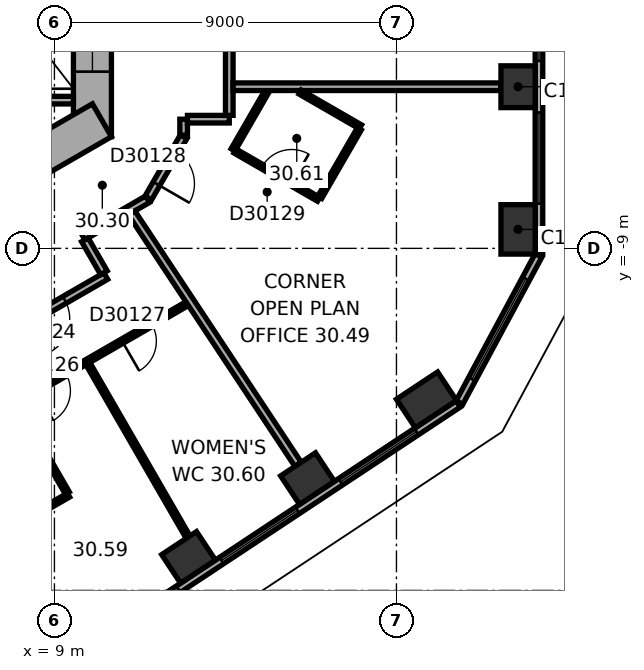
"""IFC4 building model, lengths in metres.
Left out: names, types, materials, properties, quantities, classifications, styles, units other than length and angle.
Written with IfcOpenShell. Run it as: python <this file> out.ifc"""

import sys

from ifc_helpers import new_model, si_unit, direction, frame, frame_2d, origin, origin_2d, place, context, subcontext, project, spatial, rectangle, extrude, element, fill, save


model = new_model("IFC4")
c1 = context("Model", 3, precision=1e-05, world=origin(), true_north=direction((0.0, 1.0)))
c2 = subcontext(c1, "Body", "Model", "MODEL_VIEW")
j1 = project(units=[si_unit("LENGTHUNIT", "METRE"), si_unit("PLANEANGLEUNIT", "RADIAN")], contexts=[c1])
p1 = place(None, origin())
s1 = spatial("IfcSite", under=j1, at=p1, CompositionType="ELEMENT")
p2 = place(p1, origin())
s2 = spatial("IfcBuilding", under=s1, at=p2, CompositionType="ELEMENT")
p3 = place(p2, frame((0.0, 0.0, 124.4)))
s3 = spatial("IfcBuildingStorey", under=s2, at=p3, CompositionType="ELEMENT", Elevation=124.4)
p4 = place(p3, frame((21.2, -8.501, 0.0), z_axis=(0.0, 0.0, 1.0), x_axis=(0.0, 1.0, 0.0)))
e1 = element("IfcColumn", 1, at=p4, inside=s3, PredefinedType="COLUMN", context=c2, shape_type="SweptSolid", body=[
    extrude(rectangle(XDim=1.3, YDim=0.9, at=origin_2d()), origin(), (0.0, 0.0, 1.0), 3.7),
])
for number, where, z_axis, x_axis in (
    (2, (21.2, -4.747, 0.0), (0.0, 0.0, 1.0), (0.0, 1.0, 0.0)),
    (3, (12.529, -17.13, 0.0), (0.0, 0.0, 1.0), (0.834, 0.552, 0.0)),
    (4, (15.659, -15.058, 0.0), (0.0, 0.0, 1.0), (0.834, 0.552, 0.0)),
):
    element("IfcColumn", number, at=place(p3, frame(where, z_axis=z_axis, x_axis=x_axis)), inside=s3, PredefinedType="COLUMN", context=c2, shape_type="SweptSolid", body=[
        extrude(rectangle(XDim=1.1, YDim=0.9, at=origin_2d()), origin(), (0.0, 0.0, 1.0), 3.7),
    ])
p5 = place(p3, frame((18.79, -12.986, 0.0), z_axis=(0.0, 0.0, 1.0), x_axis=(0.833885822067, 0.551936985312, 0.0)))
e5 = element("IfcColumn", 5, at=p5, inside=s3, PredefinedType="COLUMN", context=c2, shape_type="SweptSolid", body=[
    extrude(rectangle(XDim=1.3, YDim=0.9, at=origin_2d()), origin(), (0.0, 0.0, 1.0), 3.7),
])
p6 = place(p3, frame((10.0, -6.062, 0.0), z_axis=(0.0, 0.0, 1.0), x_axis=(0.0, 1.0, 0.0)))
e6 = element("IfcWall", 6, at=p6, inside=s3, PredefinedType="SHEAR", context=c2, shape_type="SweptSolid", body=[
    extrude(rectangle(XDim=12.125, YDim=1.0, at=frame_2d((6.062, 0.0))), origin(), (0.0, 0.0, 1.0), 3.7),
])
p7 = place(p6, frame((6.262, 0.0, 0.0)))
e7 = element("IfcOpeningElement", 7, at=p7, cuts=e6, PredefinedType="OPENING", context=c2, shape_type="SweptSolid", body=[
    extrude(rectangle(XDim=1.5, YDim=2.1, at=frame_2d((0.75, 1.05))), frame((0.0, 0.51, 0.0), z_axis=(0.0, -1.0, 0.0), x_axis=(1.0, 0.0, 0.0)), (0.0, 0.0, 1.0), 1.02),
])
p8 = place(p6, frame((1.712, 0.0, 0.0)))
e8 = element("IfcOpeningElement", 8, at=p8, cuts=e6, PredefinedType="OPENING", context=c2, shape_type="SweptSolid", body=[
    extrude(rectangle(XDim=1.1, YDim=2.1, at=frame_2d((0.55, 1.05))), frame((0.0, 0.51, 0.0), z_axis=(0.0, -1.0, 0.0), x_axis=(1.0, 0.0, 0.0)), (0.0, 0.0, 1.0), 1.02),
])
p9 = place(p6, frame((4.312, 0.0, 0.0)))
e9 = element("IfcOpeningElement", 9, at=p9, cuts=e6, PredefinedType="OPENING", context=c2, shape_type="SweptSolid", body=[
    extrude(rectangle(XDim=1.1, YDim=2.1, at=frame_2d((0.55, 1.05))), frame((0.0, 0.51, 0.0), z_axis=(0.0, -1.0, 0.0), x_axis=(1.0, 0.0, 0.0)), (0.0, 0.0, 1.0), 1.02),
])
p10 = place(p3, frame((-0.25, -11.691, 0.0), z_axis=(0.0, 0.0, 1.0), x_axis=(0.866022616891, 0.50000482701, 0.0)))
e10 = element("IfcWall", 10, at=p10, inside=s3, PredefinedType="SHEAR", context=c2, shape_type="SweptSolid", body=[
    extrude(rectangle(XDim=12.125, YDim=1.0, at=frame_2d((6.062, 0.0))), origin(), (0.0, 0.0, 1.0), 3.7),
])
p11 = place(p10, frame((4.012, 0.0, 0.0)))
e11 = element("IfcOpeningElement", 11, at=p11, cuts=e10, PredefinedType="OPENING", context=c2, shape_type="SweptSolid", body=[
    extrude(rectangle(XDim=0.9, YDim=2.1, at=frame_2d((0.45, 1.05))), frame((0.0, 0.51, 0.0), z_axis=(0.0, -1.0, 0.0), x_axis=(1.0, 0.0, 0.0)), (0.0, 0.0, 1.0), 1.02),
])
p12 = place(p10, frame((7.812, 0.0, 0.0)))
e12 = element("IfcOpeningElement", 12, at=p12, cuts=e10, PredefinedType="OPENING", context=c2, shape_type="SweptSolid", body=[
    extrude(rectangle(XDim=1.1, YDim=2.1, at=frame_2d((0.55, 1.05))), frame((0.0, 0.51, 0.0), z_axis=(0.0, -1.0, 0.0), x_axis=(1.0, 0.0, 0.0)), (0.0, 0.0, 1.0), 1.02),
])
p13 = place(p3, frame((21.75, -9.138, 0.0), z_axis=(0.0, 0.0, 1.0), x_axis=(0.0, 1.0, 0.0)))
e13 = element("IfcWall", 13, at=p13, inside=s3, PredefinedType="STANDARD", context=c2, shape_type="SweptSolid", body=[
    extrude(rectangle(XDim=20.044, YDim=0.2, at=frame_2d((10.022, 0.0))), origin(), (0.0, 0.0, 1.0), 3.7),
])
p14 = place(p13, frame((1.314, 0.0, 0.9)))
e14 = element("IfcOpeningElement", 14, at=p14, cuts=e13, PredefinedType="OPENING", context=c2, shape_type="SweptSolid", body=[
    extrude(rectangle(XDim=2.4, YDim=2.0, at=frame_2d((1.2, 1.0))), frame((0.0, 0.11, 0.0), z_axis=(0.0, -1.0, 0.0), x_axis=(1.0, 0.0, 0.0)), (0.0, 0.0, 1.0), 0.22),
])
p15 = place(p13, frame((5.069, 0.0, 0.9)))
e15 = element("IfcOpeningElement", 15, at=p15, cuts=e13, PredefinedType="OPENING", context=c2, shape_type="SweptSolid", body=[
    extrude(rectangle(XDim=2.4, YDim=2.0, at=frame_2d((1.2, 1.0))), frame((0.0, 0.11, 0.0), z_axis=(0.0, -1.0, 0.0), x_axis=(1.0, 0.0, 0.0)), (0.0, 0.0, 1.0), 0.22),
])
p16 = place(p13, frame((8.823, 0.0, 0.9)))
e16 = element("IfcOpeningElement", 16, at=p16, cuts=e13, PredefinedType="OPENING", context=c2, shape_type="SweptSolid", body=[
    extrude(rectangle(XDim=2.4, YDim=2.0, at=frame_2d((1.2, 1.0))), frame((0.0, 0.11, 0.0), z_axis=(0.0, -1.0, 0.0), x_axis=(1.0, 0.0, 0.0)), (0.0, 0.0, 1.0), 0.22),
])
p17 = place(p13, frame((12.577, 0.0, 0.9)))
e17 = element("IfcOpeningElement", 17, at=p17, cuts=e13, PredefinedType="OPENING", context=c2, shape_type="SweptSolid", body=[
    extrude(rectangle(XDim=2.4, YDim=2.0, at=frame_2d((1.2, 1.0))), frame((0.0, 0.11, 0.0), z_axis=(0.0, -1.0, 0.0), x_axis=(1.0, 0.0, 0.0)), (0.0, 0.0, 1.0), 0.22),
])
p18 = place(p13, frame((16.331, 0.0, 0.9)))
e18 = element("IfcOpeningElement", 18, at=p18, cuts=e13, PredefinedType="OPENING", context=c2, shape_type="SweptSolid", body=[
    extrude(rectangle(XDim=2.4, YDim=2.0, at=frame_2d((1.2, 1.0))), frame((0.0, 0.11, 0.0), z_axis=(0.0, -1.0, 0.0), x_axis=(1.0, 0.0, 0.0)), (0.0, 0.0, 1.0), 0.22),
])
p19 = place(p3, frame((2.911, -24.156, 0.0), z_axis=(0.0, 0.0, 1.0), x_axis=(0.833882163564, 0.551942512668, 0.0)))
e19 = element("IfcWall", 19, at=p19, inside=s3, PredefinedType="STANDARD", context=c2, shape_type="SweptSolid", body=[
    extrude(rectangle(XDim=20.044, YDim=0.2, at=frame_2d((10.022, 0.0))), origin(), (0.0, 0.0, 1.0), 3.7),
])
p20 = place(p19, frame((1.313, 0.0, 0.9)))
e20 = element("IfcOpeningElement", 20, at=p20, cuts=e19, PredefinedType="OPENING", context=c2, shape_type="SweptSolid", body=[
    extrude(rectangle(XDim=2.4, YDim=2.0, at=frame_2d((1.2, 1.0))), frame((0.0, 0.11, 0.0), z_axis=(0.0, -1.0, 0.0), x_axis=(1.0, 0.0, 0.0)), (0.0, 0.0, 1.0), 0.22),
])
p21 = place(p19, frame((5.067, 0.0, 0.9)))
e21 = element("IfcOpeningElement", 21, at=p21, cuts=e19, PredefinedType="OPENING", context=c2, shape_type="SweptSolid", body=[
    extrude(rectangle(XDim=2.4, YDim=2.0, at=frame_2d((1.2, 1.0))), frame((0.0, 0.11, 0.0), z_axis=(0.0, -1.0, 0.0), x_axis=(1.0, 0.0, 0.0)), (0.0, 0.0, 1.0), 0.22),
])
p22 = place(p19, frame((8.821, 0.0, 0.9)))
e22 = element("IfcOpeningElement", 22, at=p22, cuts=e19, PredefinedType="OPENING", context=c2, shape_type="SweptSolid", body=[
    extrude(rectangle(XDim=2.4, YDim=2.0, at=frame_2d((1.2, 1.0))), frame((0.0, 0.11, 0.0), z_axis=(0.0, -1.0, 0.0), x_axis=(1.0, 0.0, 0.0)), (0.0, 0.0, 1.0), 0.22),
])
p23 = place(p19, frame((12.575, 0.0, 0.9)))
e23 = element("IfcOpeningElement", 23, at=p23, cuts=e19, PredefinedType="OPENING", context=c2, shape_type="SweptSolid", body=[
    extrude(rectangle(XDim=2.4, YDim=2.0, at=frame_2d((1.2, 1.0))), frame((0.0, 0.11, 0.0), z_axis=(0.0, -1.0, 0.0), x_axis=(1.0, 0.0, 0.0)), (0.0, 0.0, 1.0), 0.22),
])
p24 = place(p19, frame((16.329, 0.0, 0.9)))
e24 = element("IfcOpeningElement", 24, at=p24, cuts=e19, PredefinedType="OPENING", context=c2, shape_type="SweptSolid", body=[
    extrude(rectangle(XDim=2.4, YDim=2.0, at=frame_2d((1.2, 1.0))), frame((0.0, 0.11, 0.0), z_axis=(0.0, -1.0, 0.0), x_axis=(1.0, 0.0, 0.0)), (0.0, 0.0, 1.0), 0.22),
])
p25 = place(p3, frame((19.658, -13.057, 0.0), z_axis=(0.0, 0.0, 1.0), x_axis=(0.473307879841, 0.880897071672, 0.0)))
e25 = element("IfcWall", 25, at=p25, inside=s3, PredefinedType="STANDARD", context=c2, shape_type="SweptSolid", body=[
    extrude(rectangle(XDim=4.395, YDim=0.2, at=frame_2d((2.197, 0.0))), origin(), (0.0, 0.0, 1.0), 3.7),
])
p26 = place(p25, frame((0.698, 0.0, 0.9)))
e26 = element("IfcOpeningElement", 26, at=p26, cuts=e25, PredefinedType="OPENING", context=c2, shape_type="SweptSolid", body=[
    extrude(rectangle(XDim=3.0, YDim=2.0, at=frame_2d((1.5, 1.0))), frame((0.0, 0.11, 0.0), z_axis=(0.0, -1.0, 0.0), x_axis=(1.0, 0.0, 0.0)), (0.0, 0.0, 1.0), 0.22),
])
p27 = place(p3, frame((7.3, -5.1, 0.0), z_axis=(0.0, 0.0, 1.0), x_axis=(1.0, 0.0, 0.0)))
e27 = element("IfcWall", 27, at=p27, inside=s3, PredefinedType="PARTITIONING", context=c2, shape_type="SweptSolid", body=[
    extrude(rectangle(XDim=2.2, YDim=0.2, at=frame_2d((1.1, 0.0))), origin(), (0.0, 0.0, 1.0), 3.42),
])
p28 = place(p3, frame((6.152, -14.116, 0.0), z_axis=(0.0, 0.0, 1.0), x_axis=(0.866026788224, 0.499997602072, 0.0)))
e28 = element("IfcWall", 28, at=p28, inside=s3, PredefinedType="PARTITIONING", context=c2, shape_type="SweptSolid", body=[
    extrude(rectangle(XDim=7.322, YDim=0.12, at=frame_2d((3.661, 0.0))), origin(), (0.0, 0.0, 1.0), 3.42),
])
p29 = place(p28, frame((0.55, 0.0, 0.0)))
e29 = element("IfcOpeningElement", 29, at=p29, cuts=e28, PredefinedType="OPENING", context=c2, shape_type="SweptSolid", body=[
    extrude(rectangle(XDim=1.0, YDim=2.1, at=frame_2d((0.5, 1.05))), frame((0.0, 0.07, 0.0), z_axis=(0.0, -1.0, 0.0), x_axis=(1.0, 0.0, 0.0)), (0.0, 0.0, 1.0), 0.14),
])
p30 = place(p28, frame((2.736, 0.0, 0.0)))
e30 = element("IfcOpeningElement", 30, at=p30, cuts=e28, PredefinedType="OPENING", context=c2, shape_type="SweptSolid", body=[
    extrude(rectangle(XDim=0.9, YDim=2.1, at=frame_2d((0.45, 1.05))), frame((0.0, 0.07, 0.0), z_axis=(0.0, -1.0, 0.0), x_axis=(1.0, 0.0, 0.0)), (0.0, 0.0, 1.0), 0.14),
])
p31 = place(p28, frame((5.347, 0.0, 0.0)))
e31 = element("IfcOpeningElement", 31, at=p31, cuts=e28, PredefinedType="OPENING", context=c2, shape_type="SweptSolid", body=[
    extrude(rectangle(XDim=0.9, YDim=2.1, at=frame_2d((0.45, 1.05))), frame((0.0, 0.07, 0.0), z_axis=(0.0, -1.0, 0.0), x_axis=(1.0, 0.0, 0.0)), (0.0, 0.0, 1.0), 0.14),
])
p32 = place(p3, frame((7.319, -11.479, 0.0), z_axis=(0.0, 0.0, 1.0), x_axis=(0.866038154057, 0.49997791523, 0.0)))
e32 = element("IfcWall", 32, at=p32, inside=s3, PredefinedType="PARTITIONING", context=c2, shape_type="SweptSolid", body=[
    extrude(rectangle(XDim=3.502, YDim=0.2, at=frame_2d((1.751, 0.0))), origin(), (0.0, 0.0, 1.0), 3.42),
])
p33 = place(p32, frame((1.251, 0.0, 0.0)))
e33 = element("IfcOpeningElement", 33, at=p33, cuts=e32, PredefinedType="OPENING", context=c2, shape_type="SweptSolid", body=[
    extrude(rectangle(XDim=1.0, YDim=2.1, at=frame_2d((0.5, 1.05))), frame((0.0, 0.11, 0.0), z_axis=(0.0, -1.0, 0.0), x_axis=(1.0, 0.0, 0.0)), (0.0, 0.0, 1.0), 0.22),
])
p34 = place(p3, frame((7.7, -16.456, 0.0), z_axis=(0.0, 0.0, 1.0), x_axis=(0.86603803935, 0.499978113919, 0.0)))
e34 = element("IfcWall", 34, at=p34, inside=s3, PredefinedType="PARTITIONING", context=c2, shape_type="SweptSolid", body=[
    extrude(rectangle(XDim=1.929, YDim=0.12, at=frame_2d((0.964, 0.0))), origin(), (0.0, 0.0, 1.0), 3.42),
])
p35 = place(p3, frame((9.15, -18.827, 0.0), z_axis=(0.0, 0.0, 1.0), x_axis=(-0.551942527453, 0.833882153777, 0.0)))
e35 = element("IfcWall", 35, at=p35, inside=s3, PredefinedType="PARTITIONING", context=c2, shape_type="SweptSolid", body=[
    extrude(rectangle(XDim=8.386, YDim=0.2, at=frame_2d((4.193, 0.0))), origin(), (0.0, 0.0, 1.0), 2.87),
])
p36 = place(p3, frame((9.34, -15.439, 0.0), z_axis=(0.0, 0.0, 1.0), x_axis=(-0.500048396672, 0.86599746015, 0.0)))
e36 = element("IfcWall", 36, at=p36, inside=s3, PredefinedType="PARTITIONING", context=c2, shape_type="SweptSolid", body=[
    extrude(rectangle(XDim=2.68, YDim=0.12, at=frame_2d((1.34, 0.0))), origin(), (0.0, 0.0, 1.0), 3.42),
])
p37 = place(p3, frame((9.752, -8.688, 0.0), z_axis=(0.0, 0.0, 1.0), x_axis=(0.865974105138, 0.500088841337, 0.0)))
e37 = element("IfcWall", 37, at=p37, inside=s3, PredefinedType="PARTITIONING", context=c2, shape_type="SweptSolid", body=[
    extrude(rectangle(XDim=1.961, YDim=0.2, at=frame_2d((0.98, 0.0))), origin(), (0.0, 0.0, 1.0), 3.42),
])
p38 = place(p3, frame((10.302, -9.642, 0.0), z_axis=(0.0, 0.0, 1.0), x_axis=(-0.500074377092, 0.865982457891, 0.0)))
e38 = element("IfcWall", 38, at=p38, inside=s3, PredefinedType="PARTITIONING", context=c2, shape_type="SweptSolid", body=[
    extrude(rectangle(XDim=1.001, YDim=0.2, at=frame_2d((0.5, 0.0))), origin(), (0.0, 0.0, 1.0), 3.42),
])
p39 = place(p3, frame((11.47, -7.673, 0.0), z_axis=(0.0, 0.0, 1.0), x_axis=(0.499964847546, 0.866045698112, 0.0)))
e39 = element("IfcWall", 39, at=p39, inside=s3, PredefinedType="PARTITIONING", context=c2, shape_type="SweptSolid", body=[
    extrude(rectangle(XDim=1.86, YDim=0.2, at=frame_2d((0.93, 0.0))), origin(), (0.0, 0.0, 1.0), 3.42),
])
p40 = place(p39, frame((0.43, 0.0, 0.0)))
e40 = element("IfcOpeningElement", 40, at=p40, cuts=e39, PredefinedType="OPENING", context=c2, shape_type="SweptSolid", body=[
    extrude(rectangle(XDim=1.0, YDim=2.1, at=frame_2d((0.5, 1.05))), frame((0.0, 0.11, 0.0), z_axis=(0.0, -1.0, 0.0), x_axis=(1.0, 0.0, 0.0)), (0.0, 0.0, 1.0), 0.22),
])
p41 = place(p3, frame((12.4, -6.022, 0.0), z_axis=(0.0, 0.0, 1.0), x_axis=(0.0, 1.0, 0.0)))
e41 = element("IfcWall", 41, at=p41, inside=s3, PredefinedType="PARTITIONING", context=c2, shape_type="SweptSolid", body=[
    extrude(rectangle(XDim=0.421, YDim=0.2, at=frame_2d((0.21, 0.0))), origin(), (0.0, 0.0, 1.0), 3.42),
])
p42 = place(p3, frame((12.5, -5.601, 0.0), z_axis=(0.0, 0.0, 1.0), x_axis=(1.0, 0.0, 0.0)))
e42 = element("IfcWall", 42, at=p42, inside=s3, PredefinedType="PARTITIONING", context=c2, shape_type="SweptSolid", body=[
    extrude(rectangle(XDim=1.101, YDim=0.2, at=frame_2d((0.551, 0.0))), origin(), (0.0, 0.0, 1.0), 3.42),
])
p43 = place(p3, frame((12.517, -16.599, 0.0), z_axis=(0.0, 0.0, 1.0), x_axis=(-0.500013727357, 0.866017478146, 0.0)))
e43 = element("IfcWall", 43, at=p43, inside=s3, PredefinedType="PARTITIONING", context=c2, shape_type="SweptSolid", body=[
    extrude(rectangle(XDim=5.272, YDim=0.12, at=frame_2d((2.636, 0.0))), origin(), (0.0, 0.0, 1.0), 3.42),
])
p44 = place(p3, frame((13.601, -5.501, 0.0), z_axis=(0.0, 0.0, 1.0), x_axis=(0.0, 1.0, 0.0)))
e44 = element("IfcWall", 44, at=p44, inside=s3, PredefinedType="PARTITIONING", context=c2, shape_type="SweptSolid", body=[
    extrude(rectangle(XDim=5.702, YDim=0.2, at=frame_2d((2.851, 0.0))), origin(), (0.0, 0.0, 1.0), 3.42),
])
p45 = place(p44, frame((2.131, 0.0, 0.0)))
e45 = element("IfcOpeningElement", 45, at=p45, cuts=e44, PredefinedType="OPENING", context=c2, shape_type="SweptSolid", body=[
    extrude(rectangle(XDim=1.0, YDim=2.1, at=frame_2d((0.5, 1.05))), frame((0.0, 0.11, 0.0), z_axis=(0.0, -1.0, 0.0), x_axis=(1.0, 0.0, 0.0)), (0.0, 0.0, 1.0), 0.22),
])
p46 = place(p3, frame((13.701, -6.409, 0.0), z_axis=(0.0, 0.0, 1.0), x_axis=(0.500078724409, 0.865979947454, 0.0)))
e46 = element("IfcWall", 46, at=p46, inside=s3, PredefinedType="PARTITIONING", context=c2, shape_type="SweptSolid", body=[
    extrude(rectangle(XDim=1.78, YDim=0.12, at=frame_2d((0.89, 0.0))), origin(), (0.0, 0.0, 1.0), 3.42),
])
p47 = place(p3, frame((13.701, -4.747, 0.0), z_axis=(0.0, 0.0, 1.0), x_axis=(1.0, 0.0, 0.0)))
e47 = element("IfcWall", 47, at=p47, inside=s3, PredefinedType="PARTITIONING", context=c2, shape_type="SweptSolid", body=[
    extrude(rectangle(XDim=7.049, YDim=0.2, at=frame_2d((3.524, 0.0))), origin(), (0.0, 0.0, 1.0), 3.42),
])
p48 = place(p3, frame((15.411, -14.683, 0.0), z_axis=(0.0, 0.0, 1.0), x_axis=(-0.551932106251, 0.833889051427, 0.0)))
e48 = element("IfcWall", 48, at=p48, inside=s3, PredefinedType="PARTITIONING", context=c2, shape_type="SweptSolid", body=[
    extrude(rectangle(XDim=7.926, YDim=0.2, at=frame_2d((3.963, 0.0))), origin(), (0.0, 0.0, 1.0), 2.87),
])
p49 = place(p3, frame((15.464, -4.887, 0.0), z_axis=(0.0, 0.0, 1.0), x_axis=(0.866063652425, -0.499933745558, 0.0)))
e49 = element("IfcWall", 49, at=p49, inside=s3, PredefinedType="PARTITIONING", context=c2, shape_type="SweptSolid", body=[
    extrude(rectangle(XDim=1.834, YDim=0.12, at=frame_2d((0.917, 0.0))), origin(), (0.0, 0.0, 1.0), 3.42),
])
p50 = place(p3, frame((15.952, -7.709, 0.0), z_axis=(0.0, 0.0, 1.0), x_axis=(-0.866063940332, 0.4999332468, 0.0)))
e50 = element("IfcWall", 50, at=p50, inside=s3, PredefinedType="PARTITIONING", context=c2, shape_type="SweptSolid", body=[
    extrude(rectangle(XDim=2.54, YDim=0.12, at=frame_2d((1.27, 0.0))), origin(), (0.0, 0.0, 1.0), 3.42),
])
p51 = place(p50, frame((0.82, 0.0, 0.0)))
e51 = element("IfcOpeningElement", 51, at=p51, cuts=e50, PredefinedType="OPENING", context=c2, shape_type="SweptSolid", body=[
    extrude(rectangle(XDim=0.9, YDim=2.1, at=frame_2d((0.45, 1.05))), frame((0.0, 0.07, 0.0), z_axis=(0.0, -1.0, 0.0), x_axis=(1.0, 0.0, 0.0)), (0.0, 0.0, 1.0), 0.14),
])
p52 = place(p3, frame((17.022, -5.856, 0.0), z_axis=(0.0, 0.0, 1.0), x_axis=(-0.500027264788, -0.866009661879, 0.0)))
e52 = element("IfcWall", 52, at=p52, inside=s3, PredefinedType="PARTITIONING", context=c2, shape_type="SweptSolid", body=[
    extrude(rectangle(XDim=2.08, YDim=0.12, at=frame_2d((1.04, 0.0))), origin(), (0.0, 0.0, 1.0), 3.42),
])
p53 = place(p14, origin())
e53 = element("IfcWindow", 53, at=p53, inside=s3, PartitioningType="SINGLE_PANEL", PredefinedType="WINDOW", context=c2, shape_type="SweptSolid", body=[
    extrude(rectangle(XDim=2.4, YDim=2.0, at=frame_2d((1.2, 1.0))), frame((0.0, 0.03, 0.0), z_axis=(0.0, -1.0, 0.0), x_axis=(1.0, 0.0, 0.0)), (0.0, 0.0, 1.0), 0.06),
])
fill(e14, e53)
p54 = place(p15, origin())
e54 = element("IfcWindow", 54, at=p54, inside=s3, PartitioningType="SINGLE_PANEL", PredefinedType="WINDOW", context=c2, shape_type="SweptSolid", body=[
    extrude(rectangle(XDim=2.4, YDim=2.0, at=frame_2d((1.2, 1.0))), frame((0.0, 0.03, 0.0), z_axis=(0.0, -1.0, 0.0), x_axis=(1.0, 0.0, 0.0)), (0.0, 0.0, 1.0), 0.06),
])
fill(e15, e54)
p55 = place(p22, origin())
e55 = element("IfcWindow", 55, at=p55, inside=s3, PartitioningType="SINGLE_PANEL", PredefinedType="WINDOW", context=c2, shape_type="SweptSolid", body=[
    extrude(rectangle(XDim=2.4, YDim=2.0, at=frame_2d((1.2, 1.0))), frame((0.0, 0.03, 0.0), z_axis=(0.0, -1.0, 0.0), x_axis=(1.0, 0.0, 0.0)), (0.0, 0.0, 1.0), 0.06),
])
fill(e22, e55)
p56 = place(p23, origin())
e56 = element("IfcWindow", 56, at=p56, inside=s3, PartitioningType="SINGLE_PANEL", PredefinedType="WINDOW", context=c2, shape_type="SweptSolid", body=[
    extrude(rectangle(XDim=2.4, YDim=2.0, at=frame_2d((1.2, 1.0))), frame((0.0, 0.03, 0.0), z_axis=(0.0, -1.0, 0.0), x_axis=(1.0, 0.0, 0.0)), (0.0, 0.0, 1.0), 0.06),
])
fill(e23, e56)
p57 = place(p24, origin())
e57 = element("IfcWindow", 57, at=p57, inside=s3, PartitioningType="SINGLE_PANEL", PredefinedType="WINDOW", context=c2, shape_type="SweptSolid", body=[
    extrude(rectangle(XDim=2.4, YDim=2.0, at=frame_2d((1.2, 1.0))), frame((0.0, 0.03, 0.0), z_axis=(0.0, -1.0, 0.0), x_axis=(1.0, 0.0, 0.0)), (0.0, 0.0, 1.0), 0.06),
])
fill(e24, e57)
p58 = place(p26, origin())
e58 = element("IfcWindow", 58, at=p58, inside=s3, PartitioningType="SINGLE_PANEL", PredefinedType="WINDOW", context=c2, shape_type="SweptSolid", body=[
    extrude(rectangle(XDim=3.0, YDim=2.0, at=frame_2d((1.5, 1.0))), frame((0.0, 0.03, 0.0), z_axis=(0.0, -1.0, 0.0), x_axis=(1.0, 0.0, 0.0)), (0.0, 0.0, 1.0), 0.06),
])
fill(e26, e58)
p59 = place(p8, origin())
e59 = element("IfcDoor", 59, at=p59, inside=s3, OperationType="DOUBLE_DOOR_SLIDING", PredefinedType="DOOR", context=c2, shape_type="SweptSolid", body=[
    extrude(rectangle(XDim=1.1, YDim=2.1, at=frame_2d((0.55, 1.05))), frame((0.0, 0.025, 0.0), z_axis=(0.0, -1.0, 0.0), x_axis=(1.0, 0.0, 0.0)), (0.0, 0.0, 1.0), 0.05),
])
fill(e8, e59)
p60 = place(p33, origin())
e60 = element("IfcDoor", 60, at=p60, inside=s3, OperationType="SINGLE_SWING_LEFT", PredefinedType="DOOR", context=c2, shape_type="SweptSolid", body=[
    extrude(rectangle(XDim=1.0, YDim=2.1, at=frame_2d((0.5, 1.05))), frame((0.0, 0.025, 0.0), z_axis=(0.0, -1.0, 0.0), x_axis=(1.0, 0.0, 0.0)), (0.0, 0.0, 1.0), 0.05),
])
fill(e33, e60)
p61 = place(p30, origin())
e61 = element("IfcDoor", 61, at=p61, inside=s3, OperationType="SINGLE_SWING_LEFT", PredefinedType="DOOR", context=c2, shape_type="SweptSolid", body=[
    extrude(rectangle(XDim=0.9, YDim=2.1, at=frame_2d((0.45, 1.05))), frame((0.0, 0.025, 0.0), z_axis=(0.0, -1.0, 0.0), x_axis=(1.0, 0.0, 0.0)), (0.0, 0.0, 1.0), 0.05),
])
fill(e30, e61)
p62 = place(p31, origin())
e62 = element("IfcDoor", 62, at=p62, inside=s3, OperationType="SINGLE_SWING_LEFT", PredefinedType="DOOR", context=c2, shape_type="SweptSolid", body=[
    extrude(rectangle(XDim=0.9, YDim=2.1, at=frame_2d((0.45, 1.05))), frame((0.0, 0.025, 0.0), z_axis=(0.0, -1.0, 0.0), x_axis=(1.0, 0.0, 0.0)), (0.0, 0.0, 1.0), 0.05),
])
fill(e31, e62)
p63 = place(p40, origin())
e63 = element("IfcDoor", 63, at=p63, inside=s3, OperationType="SINGLE_SWING_LEFT", PredefinedType="DOOR", context=c2, shape_type="SweptSolid", body=[
    extrude(rectangle(XDim=1.0, YDim=2.1, at=frame_2d((0.5, 1.05))), frame((0.0, 0.025, 0.0), z_axis=(0.0, -1.0, 0.0), x_axis=(1.0, 0.0, 0.0)), (0.0, 0.0, 1.0), 0.05),
])
fill(e40, e63)
p64 = place(p51, origin())
e64 = element("IfcDoor", 64, at=p64, inside=s3, OperationType="SINGLE_SWING_LEFT", PredefinedType="DOOR", context=c2, shape_type="SweptSolid", body=[
    extrude(rectangle(XDim=0.9, YDim=2.1, at=frame_2d((0.45, 1.05))), frame((0.0, 0.025, 0.0), z_axis=(0.0, -1.0, 0.0), x_axis=(1.0, 0.0, 0.0)), (0.0, 0.0, 1.0), 0.05),
])
fill(e51, e64)
save(model, sys.argv[1])
